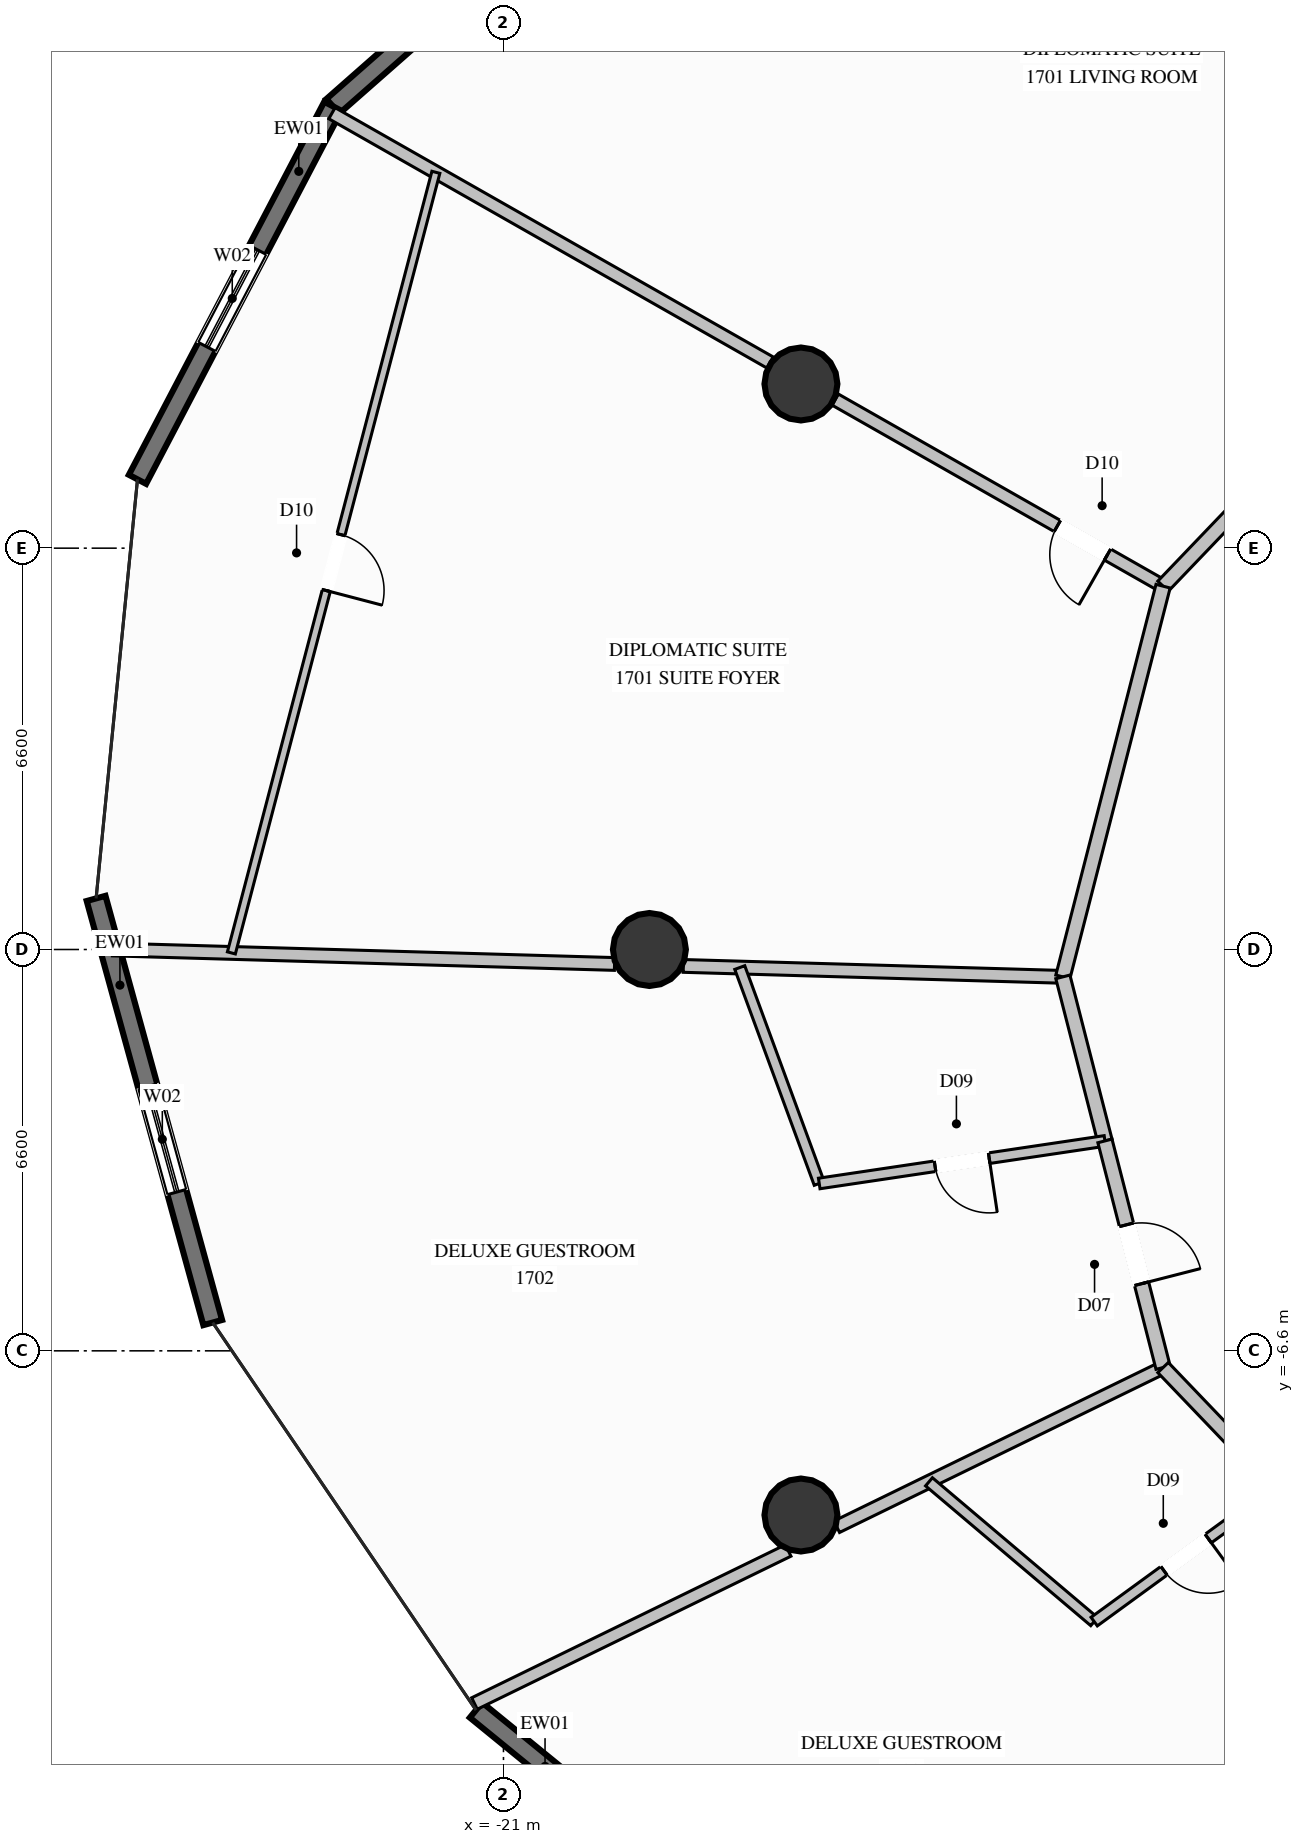
"""IFC4 building model, lengths in metres.
Left out: names, types, materials, properties, quantities, classifications, styles, units other than length and angle.
Written with IfcOpenShell. Run it as: python <this file> out.ifc"""

import sys

from ifc_helpers import new_model, si_unit, direction, frame, frame_2d, origin, origin_2d, place, context, subcontext, project, spatial, rectangle, circle, extrude, element, fill, save


model = new_model("IFC4")
c1 = context("Model", 3, precision=1e-05, world=origin(), true_north=direction((0.0, 1.0)))
c2 = subcontext(c1, "Body", "Model", "MODEL_VIEW")
j1 = project(units=[si_unit("LENGTHUNIT", "METRE"), si_unit("PLANEANGLEUNIT", "RADIAN")], contexts=[c1])
p1 = place(None, origin())
s1 = spatial("IfcSite", under=j1, at=p1, CompositionType="ELEMENT")
p2 = place(p1, origin())
s2 = spatial("IfcBuilding", under=s1, at=p2, CompositionType="ELEMENT")
p3 = place(p2, frame((0.0, 0.0, 64.4)))
s3 = spatial("IfcBuildingStorey", under=s2, at=p3, CompositionType="ELEMENT", Elevation=64.4)
for number, where, z_axis, x_axis in (
    (1, (-16.108, 9.3, 0.0), (0.0, 0.0, 1.0), (1.0, 0.0, 0.0)),
    (2, (-18.6, 0.0, 0.0), (0.0, 0.0, 1.0), (1.0, 0.0, 0.0)),
    (3, (-16.108, -9.3, 0.0), (0.0, 0.0, 1.0), (1.0, 0.0, 0.0)),
):
    element("IfcColumn", number, at=place(p3, frame(where, z_axis=z_axis, x_axis=x_axis)), inside=s3, PredefinedType="COLUMN", context=c2, shape_type="SweptSolid", body=[
        extrude(circle(Radius=0.6, at=origin_2d()), origin(), (0.0, 0.0, 1.0), 3.6),
    ])
p4 = place(p3, frame((-23.806, 13.867, 0.0), z_axis=(0.0, 0.0, 1.0), x_axis=(0.750731596094, 0.660607349812, 0.0)))
e4 = element("IfcWall", 4, at=p4, inside=s3, PredefinedType="SOLIDWALL", context=c2, shape_type="SweptSolid", body=[
    extrude(rectangle(XDim=7.233, YDim=0.32, at=frame_2d((3.616, 0.0))), origin(), (0.0, 0.0, 1.0), 3.34),
])
p5 = place(p4, frame((2.579, 0.0, 0.35)))
e5 = element("IfcOpeningElement", 5, at=p5, cuts=e4, PredefinedType="OPENING", context=c2, shape_type="SweptSolid", body=[
    extrude(rectangle(XDim=1.8, YDim=2.6, at=frame_2d((0.9, 1.3))), frame((0.0, 0.17, 0.0), z_axis=(0.0, -1.0, 0.0), x_axis=(1.0, 0.0, 0.0)), (0.0, 0.0, 1.0), 0.34),
])
p6 = place(p3, frame((-27.019, 7.732, 0.0), z_axis=(0.0, 0.0, 1.0), x_axis=(0.46395693802, 0.885857753628, 0.0)))
e6 = element("IfcWall", 6, at=p6, inside=s3, PredefinedType="SOLIDWALL", context=c2, shape_type="SweptSolid", body=[
    extrude(rectangle(XDim=6.926, YDim=0.32, at=frame_2d((3.463, 0.0))), origin(), (0.0, 0.0, 1.0), 3.34),
])
p7 = place(p6, frame((2.459, 0.0, 0.35)))
e7 = element("IfcOpeningElement", 7, at=p7, cuts=e6, PredefinedType="OPENING", context=c2, shape_type="SweptSolid", body=[
    extrude(rectangle(XDim=1.8, YDim=2.6, at=frame_2d((0.9, 1.3))), frame((0.0, 0.17, 0.0), z_axis=(0.0, -1.0, 0.0), x_axis=(1.0, 0.0, 0.0)), (0.0, 0.0, 1.0), 0.34),
])
p8 = place(p3, frame((-25.782, -6.135, 0.0), z_axis=(0.0, 0.0, 1.0), x_axis=(-0.265132950738, 0.964211863873, 0.0)))
e8 = element("IfcWall", 8, at=p8, inside=s3, PredefinedType="SOLIDWALL", context=c2, shape_type="SweptSolid", body=[
    extrude(rectangle(XDim=7.234, YDim=0.32, at=frame_2d((3.617, 0.0))), origin(), (0.0, 0.0, 1.0), 3.34),
])
p9 = place(p8, frame((2.226, 0.0, 0.35)))
e9 = element("IfcOpeningElement", 9, at=p9, cuts=e8, PredefinedType="OPENING", context=c2, shape_type="SweptSolid", body=[
    extrude(rectangle(XDim=1.8, YDim=2.6, at=frame_2d((0.9, 1.3))), frame((0.0, 0.17, 0.0), z_axis=(0.0, -1.0, 0.0), x_axis=(1.0, 0.0, 0.0)), (0.0, 0.0, 1.0), 0.34),
])
p10 = place(p3, frame((-15.136, -17.658, 0.0), z_axis=(0.0, 0.0, 1.0), x_axis=(-0.775018687806, 0.631938314673, 0.0)))
e10 = element("IfcWall", 10, at=p10, inside=s3, PredefinedType="SOLIDWALL", context=c2, shape_type="SweptSolid", body=[
    extrude(rectangle(XDim=8.149, YDim=0.32, at=frame_2d((4.075, 0.0))), origin(), (0.0, 0.0, 1.0), 3.34),
])
p11 = place(p10, frame((3.169, 0.0, 0.35)))
e11 = element("IfcOpeningElement", 11, at=p11, cuts=e10, PredefinedType="OPENING", context=c2, shape_type="SweptSolid", body=[
    extrude(rectangle(XDim=1.8, YDim=2.6, at=frame_2d((0.9, 1.3))), frame((0.0, 0.17, 0.0), z_axis=(0.0, -1.0, 0.0), x_axis=(1.0, 0.0, 0.0)), (0.0, 0.0, 1.0), 0.34),
])
p12 = place(p3, frame((-10.152, 5.975, 0.0), z_axis=(0.0, 0.0, 1.0), x_axis=(-0.869157123992, 0.494536038944, 0.0)))
e12 = element("IfcWall", 12, at=p12, inside=s3, PredefinedType="PARTITIONING", context=c2, shape_type="SweptSolid", body=[
    extrude(rectangle(XDim=6.204, YDim=0.21, at=frame_2d((3.102, 0.0))), origin(), (0.0, 0.0, 1.0), 2.708),
])
p13 = place(p12, frame((1.051, 0.0, 0.0)))
e13 = element("IfcOpeningElement", 13, at=p13, cuts=e12, PredefinedType="OPENING", context=c2, shape_type="SweptSolid", body=[
    extrude(rectangle(XDim=0.95, YDim=2.1, at=frame_2d((0.475, 1.05))), frame((0.0, 0.115, 0.0), z_axis=(0.0, -1.0, 0.0), x_axis=(1.0, 0.0, 0.0)), (0.0, 0.0, 1.0), 0.23),
])
p14 = place(p3, frame((-16.617, 9.654, 0.0), z_axis=(0.0, 0.0, 1.0), x_axis=(-0.869164268593, 0.494523481951, 0.0)))
e14 = element("IfcWall", 14, at=p14, inside=s3, PredefinedType="PARTITIONING", context=c2, shape_type="SweptSolid", body=[
    extrude(rectangle(XDim=8.289, YDim=0.21, at=frame_2d((4.144, 0.0))), origin(), (0.0, 0.0, 1.0), 3.34),
])
p15 = place(p3, frame((-11.8, -0.45, 0.0), z_axis=(0.0, 0.0, 1.0), x_axis=(-0.999584783233, 0.02881425217, 0.0)))
e15 = element("IfcWall", 15, at=p15, inside=s3, PredefinedType="PARTITIONING", context=c2, shape_type="SweptSolid", body=[
    extrude(rectangle(XDim=6.245, YDim=0.21, at=frame_2d((3.122, 0.0))), origin(), (0.0, 0.0, 1.0), 2.708),
])
p16 = place(p3, frame((-19.173, -0.238, 0.0), z_axis=(0.0, 0.0, 1.0), x_axis=(-0.999584602295, 0.028820528366, 0.0)))
e16 = element("IfcWall", 16, at=p16, inside=s3, PredefinedType="PARTITIONING", context=c2, shape_type="SweptSolid", body=[
    extrude(rectangle(XDim=8.259, YDim=0.21, at=frame_2d((4.13, 0.0))), origin(), (0.0, 0.0, 1.0), 3.34),
])
p17 = place(p3, frame((-10.152, -6.875, 0.0), z_axis=(0.0, 0.0, 1.0), x_axis=(-0.898775125454, -0.438409938145, 0.0)))
e17 = element("IfcWall", 17, at=p17, inside=s3, PredefinedType="PARTITIONING", context=c2, shape_type="SweptSolid", body=[
    extrude(rectangle(XDim=5.971, YDim=0.21, at=frame_2d((2.986, 0.0))), origin(), (0.0, 0.0, 1.0), 2.708),
])
p18 = place(p3, frame((-16.318, -9.883, 0.0), z_axis=(0.0, 0.0, 1.0), x_axis=(-0.898748415115, -0.438464692226, 0.0)))
e18 = element("IfcWall", 18, at=p18, inside=s3, PredefinedType="PARTITIONING", context=c2, shape_type="SweptSolid", body=[
    extrude(rectangle(XDim=5.74, YDim=0.21, at=frame_2d((2.87, 0.0))), origin(), (0.0, 0.0, 1.0), 3.34),
])
p19 = place(p3, frame((-5.65, 10.678, 0.0), z_axis=(0.0, 0.0, 1.0), x_axis=(-0.691526541012, -0.72235105252, 0.0)))
e19 = element("IfcWall", 19, at=p19, inside=s3, PredefinedType="PARTITIONING", context=c2, shape_type="SweptSolid", body=[
    extrude(rectangle(XDim=6.51, YDim=0.24, at=frame_2d((3.255, 0.0))), origin(), (0.0, 0.0, 1.0), 3.34),
])
p20 = place(p3, frame((-10.152, 5.975, 0.0), z_axis=(0.0, 0.0, 1.0), x_axis=(-0.248446193127, -0.968645698447, 0.0)))
e20 = element("IfcWall", 20, at=p20, inside=s3, PredefinedType="PARTITIONING", context=c2, shape_type="SweptSolid", body=[
    extrude(rectangle(XDim=6.633, YDim=0.24, at=frame_2d((3.316, 0.0))), origin(), (0.0, 0.0, 1.0), 3.34),
])
p21 = place(p3, frame((-22.112, 12.781, 0.0), z_axis=(0.0, 0.0, 1.0), x_axis=(-0.253429078168, -0.967353969516, 0.0)))
e21 = element("IfcWall", 21, at=p21, inside=s3, PredefinedType="PARTITIONING", context=c2, shape_type="SweptSolid", body=[
    extrude(rectangle(XDim=13.27, YDim=0.135, at=frame_2d((6.635, 0.0))), origin(), (0.0, 0.0, 1.0), 3.34),
])
p22 = place(p21, frame((6.16, 0.0, 0.0)))
e22 = element("IfcOpeningElement", 22, at=p22, cuts=e21, PredefinedType="OPENING", context=c2, shape_type="SweptSolid", body=[
    extrude(rectangle(XDim=0.95, YDim=2.1, at=frame_2d((0.475, 1.05))), frame((0.0, 0.078, 0.0), z_axis=(0.0, -1.0, 0.0), x_axis=(1.0, 0.0, 0.0)), (0.0, 0.0, 1.0), 0.155),
])
p23 = place(p3, frame((-11.8, -0.45, 0.0), z_axis=(0.0, 0.0, 1.0), x_axis=(0.248491333658, -0.968634119313, 0.0)))
e23 = element("IfcWall", 23, at=p23, inside=s3, PredefinedType="PARTITIONING", context=c2, shape_type="SweptSolid", body=[
    extrude(rectangle(XDim=2.785, YDim=0.24, at=frame_2d((1.393, 0.0))), origin(), (0.0, 0.0, 1.0), 3.34),
])
p24 = place(p3, frame((-17.114, -0.297, 0.0), z_axis=(0.0, 0.0, 1.0), x_axis=(0.345460156776, -0.938433418033, 0.0)))
e24 = element("IfcWall", 24, at=p24, inside=s3, PredefinedType="PLUMBINGWALL", context=c2, shape_type="SweptSolid", body=[
    extrude(rectangle(XDim=3.784, YDim=0.175, at=frame_2d((1.892, 0.0))), origin(), (0.0, 0.0, 1.0), 3.34),
])
p25 = place(p3, frame((-11.108, -3.148, 0.0), z_axis=(0.0, 0.0, 1.0), x_axis=(-0.989086991432, -0.147332696235, 0.0)))
e25 = element("IfcWall", 25, at=p25, inside=s3, PredefinedType="PLUMBINGWALL", context=c2, shape_type="SweptSolid", body=[
    extrude(rectangle(XDim=4.751, YDim=0.175, at=frame_2d((2.375, 0.0))), origin(), (0.0, 0.0, 1.0), 3.34),
])
p26 = place(p25, frame((1.925, 0.0, 0.0)))
e26 = element("IfcOpeningElement", 26, at=p26, cuts=e25, PredefinedType="OPENING", context=c2, shape_type="SweptSolid", body=[
    extrude(rectangle(XDim=0.9, YDim=2.1, at=frame_2d((0.45, 1.05))), frame((0.0, 0.098, 0.0), z_axis=(0.0, -1.0, 0.0), x_axis=(1.0, 0.0, 0.0)), (0.0, 0.0, 1.0), 0.195),
])
p27 = place(p3, frame((-11.108, -3.148, 0.0), z_axis=(0.0, 0.0, 1.0), x_axis=(0.248413515056, -0.9686540794, 0.0)))
e27 = element("IfcWall", 27, at=p27, inside=s3, PredefinedType="PARTITIONING", context=c2, shape_type="SweptSolid", body=[
    extrude(rectangle(XDim=3.848, YDim=0.24, at=frame_2d((1.924, 0.0))), origin(), (0.0, 0.0, 1.0), 3.34),
])
p28 = place(p27, frame((1.424, 0.0, 0.0)))
e28 = element("IfcOpeningElement", 28, at=p28, cuts=e27, PredefinedType="OPENING", context=c2, shape_type="SweptSolid", body=[
    extrude(rectangle(XDim=1.0, YDim=2.2, at=frame_2d((0.5, 1.1))), frame((0.0, 0.13, 0.0), z_axis=(0.0, -1.0, 0.0), x_axis=(1.0, 0.0, 0.0)), (0.0, 0.0, 1.0), 0.26),
])
p29 = place(p3, frame((-10.152, -6.875, 0.0), z_axis=(0.0, 0.0, 1.0), x_axis=(0.691583392139, -0.722296623083, 0.0)))
e29 = element("IfcWall", 29, at=p29, inside=s3, PredefinedType="PARTITIONING", context=c2, shape_type="SweptSolid", body=[
    extrude(rectangle(XDim=2.734, YDim=0.24, at=frame_2d((1.367, 0.0))), origin(), (0.0, 0.0, 1.0), 3.34),
])
p30 = place(p3, frame((-14.002, -8.754, 0.0), z_axis=(0.0, 0.0, 1.0), x_axis=(0.763381081672, -0.64594839124, 0.0)))
e30 = element("IfcWall", 30, at=p30, inside=s3, PredefinedType="PLUMBINGWALL", context=c2, shape_type="SweptSolid", body=[
    extrude(rectangle(XDim=3.559, YDim=0.175, at=frame_2d((1.78, 0.0))), origin(), (0.0, 0.0, 1.0), 3.34),
])
p31 = place(p3, frame((-8.261, -8.85, 0.0), z_axis=(0.0, 0.0, 1.0), x_axis=(-0.8082702151, -0.588811735092, 0.0)))
e31 = element("IfcWall", 31, at=p31, inside=s3, PredefinedType="PLUMBINGWALL", context=c2, shape_type="SweptSolid", body=[
    extrude(rectangle(XDim=3.741, YDim=0.175, at=frame_2d((1.871, 0.0))), origin(), (0.0, 0.0, 1.0), 3.34),
])
p32 = place(p31, frame((1.421, 0.0, 0.0)))
e32 = element("IfcOpeningElement", 32, at=p32, cuts=e31, PredefinedType="OPENING", context=c2, shape_type="SweptSolid", body=[
    extrude(rectangle(XDim=0.9, YDim=2.1, at=frame_2d((0.45, 1.05))), frame((0.0, 0.098, 0.0), z_axis=(0.0, -1.0, 0.0), x_axis=(1.0, 0.0, 0.0)), (0.0, 0.0, 1.0), 0.195),
])
p33 = place(p7, origin())
e33 = element("IfcWindow", 33, at=p33, inside=s3, PartitioningType="SINGLE_PANEL", PredefinedType="WINDOW", context=c2, shape_type="SweptSolid", body=[
    extrude(rectangle(XDim=1.8, YDim=2.6, at=frame_2d((0.9, 1.3))), frame((0.0, 0.03, 0.0), z_axis=(0.0, -1.0, 0.0), x_axis=(1.0, 0.0, 0.0)), (0.0, 0.0, 1.0), 0.06),
])
fill(e7, e33)
p34 = place(p9, origin())
e34 = element("IfcWindow", 34, at=p34, inside=s3, PartitioningType="SINGLE_PANEL", PredefinedType="WINDOW", context=c2, shape_type="SweptSolid", body=[
    extrude(rectangle(XDim=1.8, YDim=2.6, at=frame_2d((0.9, 1.3))), frame((0.0, 0.03, 0.0), z_axis=(0.0, -1.0, 0.0), x_axis=(1.0, 0.0, 0.0)), (0.0, 0.0, 1.0), 0.06),
])
fill(e9, e34)
p35 = place(p13, origin())
e35 = element("IfcDoor", 35, at=p35, inside=s3, OperationType="SINGLE_SWING_LEFT", PredefinedType="DOOR", context=c2, shape_type="SweptSolid", body=[
    extrude(rectangle(XDim=0.95, YDim=2.1, at=frame_2d((0.475, 1.05))), frame((0.0, 0.025, 0.0), z_axis=(0.0, -1.0, 0.0), x_axis=(1.0, 0.0, 0.0)), (0.0, 0.0, 1.0), 0.05),
])
fill(e13, e35)
p36 = place(p22, origin())
e36 = element("IfcDoor", 36, at=p36, inside=s3, OperationType="SINGLE_SWING_RIGHT", PredefinedType="DOOR", context=c2, shape_type="SweptSolid", body=[
    extrude(rectangle(XDim=0.95, YDim=2.1, at=frame_2d((0.475, 1.05))), frame((0.0, 0.025, 0.0), z_axis=(0.0, -1.0, 0.0), x_axis=(1.0, 0.0, 0.0)), (0.0, 0.0, 1.0), 0.05),
])
fill(e22, e36)
p37 = place(p26, origin())
e37 = element("IfcDoor", 37, at=p37, inside=s3, OperationType="SINGLE_SWING_LEFT", PredefinedType="DOOR", context=c2, shape_type="SweptSolid", body=[
    extrude(rectangle(XDim=0.9, YDim=2.1, at=frame_2d((0.45, 1.05))), frame((0.0, 0.025, 0.0), z_axis=(0.0, -1.0, 0.0), x_axis=(1.0, 0.0, 0.0)), (0.0, 0.0, 1.0), 0.05),
])
fill(e26, e37)
p38 = place(p28, origin())
e38 = element("IfcDoor", 38, at=p38, inside=s3, OperationType="SINGLE_SWING_RIGHT", PredefinedType="DOOR", context=c2, shape_type="SweptSolid", body=[
    extrude(rectangle(XDim=1.0, YDim=2.2, at=frame_2d((0.5, 1.1))), frame((0.0, 0.025, 0.0), z_axis=(0.0, -1.0, 0.0), x_axis=(1.0, 0.0, 0.0)), (0.0, 0.0, 1.0), 0.05),
])
fill(e28, e38)
p39 = place(p32, origin())
e39 = element("IfcDoor", 39, at=p39, inside=s3, OperationType="SINGLE_SWING_LEFT", PredefinedType="DOOR", context=c2, shape_type="SweptSolid", body=[
    extrude(rectangle(XDim=0.9, YDim=2.1, at=frame_2d((0.45, 1.05))), frame((0.0, 0.025, 0.0), z_axis=(0.0, -1.0, 0.0), x_axis=(1.0, 0.0, 0.0)), (0.0, 0.0, 1.0), 0.05),
])
fill(e32, e39)
save(model, sys.argv[1])
